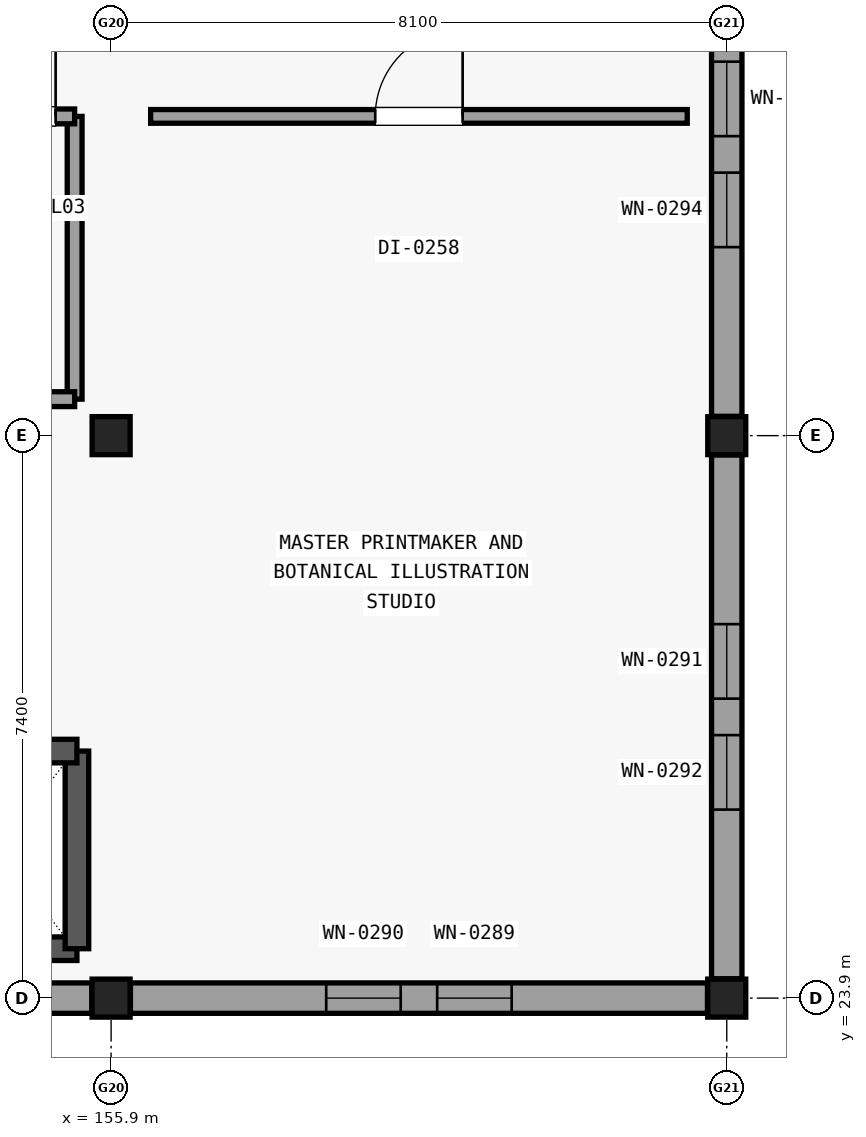
"""IFC4 building model, lengths in metres.
Left out: names, types, materials, properties, quantities, classifications, styles, units other than length and angle.
Written with IfcOpenShell. Run it as: python <this file> out.ifc"""

import sys

from ifc_helpers import new_model, si_unit, direction, frame, frame_2d, origin, origin_2d, place, context, subcontext, project, spatial, rectangle, extrude, element, fill, save


model = new_model("IFC4")
c1 = context("Model", 3, precision=1e-05, world=origin(), true_north=direction((0.0, 1.0)))
c2 = subcontext(c1, "Body", "Model", "MODEL_VIEW")
j1 = project(units=[si_unit("LENGTHUNIT", "METRE"), si_unit("PLANEANGLEUNIT", "RADIAN")], contexts=[c1])
p1 = place(None, origin())
s1 = spatial("IfcSite", under=j1, at=p1, CompositionType="ELEMENT")
p2 = place(p1, origin())
s2 = spatial("IfcBuilding", under=s1, at=p2, CompositionType="ELEMENT")
p3 = place(p2, frame((0.0, 0.0, 13.8)))
s3 = spatial("IfcBuildingStorey", under=s2, at=p3, CompositionType="ELEMENT", Elevation=13.8)
for number, where, z_axis, x_axis in (
    (1, (155.9, 23.9, 0.0), (0.0, 0.0, 1.0), (1.0, 0.0, 0.0)),
    (2, (155.9, 31.3, 0.0), (0.0, 0.0, 1.0), (1.0, 0.0, 0.0)),
    (3, (164.0, 23.9, 0.0), (0.0, 0.0, 1.0), (1.0, 0.0, 0.0)),
    (4, (164.0, 31.3, 0.0), (0.0, 0.0, 1.0), (1.0, 0.0, 0.0)),
):
    element("IfcColumn", number, at=place(p3, frame(where, z_axis=z_axis, x_axis=x_axis)), inside=s3, PredefinedType="COLUMN", context=c2, shape_type="SweptSolid", body=[
        extrude(rectangle(XDim=0.5, YDim=0.5, at=origin_2d()), origin(), (0.0, 0.0, 1.0), 3.38),
    ])
p4 = place(p3, frame((155.646, 23.9, 0.0), z_axis=(0.0, 0.0, 1.0), x_axis=(-1.0, 0.0, 0.0)))
e5 = element("IfcWall", 5, at=p4, inside=s3, PredefinedType="SOLIDWALL", context=c2, shape_type="SweptSolid", body=[
    extrude(rectangle(XDim=7.592, YDim=0.4, at=frame_2d((3.796, 0.0))), origin(), (0.0, 0.0, 1.0), 2.908),
])
p5 = place(p4, frame((2.576, 0.0, 0.6)))
e6 = element("IfcOpeningElement", 6, at=p5, cuts=e5, PredefinedType="OPENING", context=c2, shape_type="SweptSolid", body=[
    extrude(rectangle(XDim=0.98, YDim=1.95, at=frame_2d((0.49, 0.975))), frame((0.0, 0.21, 0.0), z_axis=(0.0, -1.0, 0.0), x_axis=(1.0, 0.0, 0.0)), (0.0, 0.0, 1.0), 0.42),
])
p6 = place(p4, frame((4.036, 0.0, 0.6)))
e7 = element("IfcOpeningElement", 7, at=p6, cuts=e5, PredefinedType="OPENING", context=c2, shape_type="SweptSolid", body=[
    extrude(rectangle(XDim=0.98, YDim=1.95, at=frame_2d((0.49, 0.975))), frame((0.0, 0.21, 0.0), z_axis=(0.0, -1.0, 0.0), x_axis=(1.0, 0.0, 0.0)), (0.0, 0.0, 1.0), 0.42),
])
p7 = place(p3, frame((163.746, 23.9, 0.0), z_axis=(0.0, 0.0, 1.0), x_axis=(-1.0, 0.0, 0.0)))
e8 = element("IfcWall", 8, at=p7, inside=s3, PredefinedType="SOLIDWALL", context=c2, shape_type="SweptSolid", body=[
    extrude(rectangle(XDim=7.592, YDim=0.4, at=frame_2d((3.796, 0.0))), origin(), (0.0, 0.0, 1.0), 2.908),
])
p8 = place(p7, frame((2.576, 0.0, 0.6)))
e9 = element("IfcOpeningElement", 9, at=p8, cuts=e8, PredefinedType="OPENING", context=c2, shape_type="SweptSolid", body=[
    extrude(rectangle(XDim=0.98, YDim=1.95, at=frame_2d((0.49, 0.975))), frame((0.0, 0.21, 0.0), z_axis=(0.0, -1.0, 0.0), x_axis=(1.0, 0.0, 0.0)), (0.0, 0.0, 1.0), 0.42),
])
p9 = place(p7, frame((4.036, 0.0, 0.6)))
e10 = element("IfcOpeningElement", 10, at=p9, cuts=e8, PredefinedType="OPENING", context=c2, shape_type="SweptSolid", body=[
    extrude(rectangle(XDim=0.98, YDim=1.95, at=frame_2d((0.49, 0.975))), frame((0.0, 0.21, 0.0), z_axis=(0.0, -1.0, 0.0), x_axis=(1.0, 0.0, 0.0)), (0.0, 0.0, 1.0), 0.42),
])
p10 = place(p3, frame((164.0, 31.046, 0.0), z_axis=(0.0, 0.0, 1.0), x_axis=(0.0, -1.0, 0.0)))
e11 = element("IfcWall", 11, at=p10, inside=s3, PredefinedType="SOLIDWALL", context=c2, shape_type="SweptSolid", body=[
    extrude(rectangle(XDim=6.892, YDim=0.4, at=frame_2d((3.446, 0.0))), origin(), (0.0, 0.0, 1.0), 2.908),
])
p11 = place(p10, frame((2.226, 0.0, 0.6)))
e12 = element("IfcOpeningElement", 12, at=p11, cuts=e11, PredefinedType="OPENING", context=c2, shape_type="SweptSolid", body=[
    extrude(rectangle(XDim=0.98, YDim=1.95, at=frame_2d((0.49, 0.975))), frame((0.0, 0.21, 0.0), z_axis=(0.0, -1.0, 0.0), x_axis=(1.0, 0.0, 0.0)), (0.0, 0.0, 1.0), 0.42),
])
p12 = place(p10, frame((3.686, 0.0, 0.6)))
e13 = element("IfcOpeningElement", 13, at=p12, cuts=e11, PredefinedType="OPENING", context=c2, shape_type="SweptSolid", body=[
    extrude(rectangle(XDim=0.98, YDim=1.95, at=frame_2d((0.49, 0.975))), frame((0.0, 0.21, 0.0), z_axis=(0.0, -1.0, 0.0), x_axis=(1.0, 0.0, 0.0)), (0.0, 0.0, 1.0), 0.42),
])
p13 = place(p3, frame((164.0, 38.446, 0.0), z_axis=(0.0, 0.0, 1.0), x_axis=(0.0, -1.0, 0.0)))
e14 = element("IfcWall", 14, at=p13, inside=s3, PredefinedType="SOLIDWALL", context=c2, shape_type="SweptSolid", body=[
    extrude(rectangle(XDim=6.892, YDim=0.4, at=frame_2d((3.446, 0.0))), origin(), (0.0, 0.0, 1.0), 2.908),
])
p14 = place(p13, frame((2.226, 0.0, 0.6)))
e15 = element("IfcOpeningElement", 15, at=p14, cuts=e14, PredefinedType="OPENING", context=c2, shape_type="SweptSolid", body=[
    extrude(rectangle(XDim=0.98, YDim=1.95, at=frame_2d((0.49, 0.975))), frame((0.0, 0.21, 0.0), z_axis=(0.0, -1.0, 0.0), x_axis=(1.0, 0.0, 0.0)), (0.0, 0.0, 1.0), 0.42),
])
p15 = place(p13, frame((3.686, 0.0, 0.6)))
e16 = element("IfcOpeningElement", 16, at=p15, cuts=e14, PredefinedType="OPENING", context=c2, shape_type="SweptSolid", body=[
    extrude(rectangle(XDim=0.98, YDim=1.95, at=frame_2d((0.49, 0.975))), frame((0.0, 0.21, 0.0), z_axis=(0.0, -1.0, 0.0), x_axis=(1.0, 0.0, 0.0)), (0.0, 0.0, 1.0), 0.42),
])
p16 = place(p3, frame((153.35, 24.55, 0.0), z_axis=(0.0, 0.0, 1.0), x_axis=(1.0, 0.0, 0.0)))
e17 = element("IfcWall", 17, at=p16, inside=s3, PredefinedType="SHEAR", context=c2, shape_type="SweptSolid", body=[
    extrude(rectangle(XDim=2.1, YDim=0.31, at=frame_2d((1.05, 0.0))), origin(), (0.0, 0.0, 1.0), 3.375),
])
p17 = place(p3, frame((155.45, 24.55, 0.0), z_axis=(0.0, 0.0, 1.0), x_axis=(0.0, 1.0, 0.0)))
e18 = element("IfcWall", 18, at=p17, inside=s3, PredefinedType="SHEAR", context=c2, shape_type="SweptSolid", body=[
    extrude(rectangle(XDim=2.6, YDim=0.31, at=frame_2d((1.3, 0.0))), origin(), (0.0, 0.0, 1.0), 3.375),
])
p18 = place(p3, frame((153.35, 27.15, 0.0), z_axis=(0.0, 0.0, 1.0), x_axis=(1.0, 0.0, 0.0)))
e19 = element("IfcWall", 19, at=p18, inside=s3, PredefinedType="SHEAR", context=c2, shape_type="SweptSolid", body=[
    extrude(rectangle(XDim=2.1, YDim=0.31, at=frame_2d((1.05, 0.0))), origin(), (0.0, 0.0, 1.0), 3.375),
])
p19 = place(p18, frame((0.5, 0.0, 0.0)))
e20 = element("IfcOpeningElement", 20, at=p19, cuts=e19, PredefinedType="OPENING", context=c2, shape_type="SweptSolid", body=[
    extrude(rectangle(XDim=1.1, YDim=2.15, at=frame_2d((0.55, 1.075))), frame((0.0, 0.165, 0.0), z_axis=(0.0, -1.0, 0.0), x_axis=(1.0, 0.0, 0.0)), (0.0, 0.0, 1.0), 0.33),
])
p20 = place(p3, frame((155.42, 31.78, 0.0), z_axis=(0.0, 0.0, 1.0), x_axis=(0.0, 1.0, 0.0)))
e21 = element("IfcWall", 21, at=p20, inside=s3, PredefinedType="PARTITIONING", context=c2, shape_type="SweptSolid", body=[
    extrude(rectangle(XDim=3.72, YDim=0.195, at=frame_2d((1.86, 0.0))), origin(), (0.0, 0.0, 1.0), 2.913),
])
p21 = place(p3, frame((152.45, 31.78, 0.0), z_axis=(0.0, 0.0, 1.0), x_axis=(1.0, 0.0, 0.0)))
e22 = element("IfcWall", 22, at=p21, inside=s3, PredefinedType="PARTITIONING", context=c2, shape_type="SweptSolid", body=[
    extrude(rectangle(XDim=2.97, YDim=0.195, at=frame_2d((1.485, 0.0))), origin(), (0.0, 0.0, 1.0), 2.913),
])
p22 = place(p3, frame((152.45, 35.5, 0.0), z_axis=(0.0, 0.0, 1.0), x_axis=(1.0, 0.0, 0.0)))
e23 = element("IfcWall", 23, at=p22, inside=s3, PredefinedType="PARTITIONING", context=c2, shape_type="SweptSolid", body=[
    extrude(rectangle(XDim=2.97, YDim=0.195, at=frame_2d((1.485, 0.0))), origin(), (0.0, 0.0, 1.0), 2.913),
])
p23 = place(p22, frame((0.25, 0.0, 0.0)))
e24 = element("IfcOpeningElement", 24, at=p23, cuts=e23, PredefinedType="OPENING", context=c2, shape_type="SweptSolid", body=[
    extrude(rectangle(XDim=0.95, YDim=2.1, at=frame_2d((0.475, 1.05))), frame((0.0, 0.107, 0.0), z_axis=(0.0, -1.0, 0.0), x_axis=(1.0, 0.0, 0.0)), (0.0, 0.0, 1.0), 0.215),
])
p24 = place(p22, frame((1.82, 0.0, 0.0)))
e25 = element("IfcOpeningElement", 25, at=p24, cuts=e23, PredefinedType="OPENING", context=c2, shape_type="SweptSolid", body=[
    extrude(rectangle(XDim=0.9, YDim=2.1, at=frame_2d((0.45, 1.05))), frame((0.0, 0.107, 0.0), z_axis=(0.0, -1.0, 0.0), x_axis=(1.0, 0.0, 0.0)), (0.0, 0.0, 1.0), 0.215),
])
p25 = place(p3, frame((156.42, 35.5, 0.0), z_axis=(0.0, 0.0, 1.0), x_axis=(1.0, 0.0, 0.0)))
e26 = element("IfcWall", 26, at=p25, inside=s3, PredefinedType="PARTITIONING", context=c2, shape_type="SweptSolid", body=[
    extrude(rectangle(XDim=7.06, YDim=0.18, at=frame_2d((3.53, 0.0))), origin(), (0.0, 0.0, 1.0), 2.913),
])
p26 = place(p25, frame((2.955, 0.0, 0.0)))
e27 = element("IfcOpeningElement", 27, at=p26, cuts=e26, PredefinedType="OPENING", context=c2, shape_type="SweptSolid", body=[
    extrude(rectangle(XDim=1.15, YDim=2.15, at=frame_2d((0.575, 1.075))), frame((0.0, 0.1, 0.0), z_axis=(0.0, -1.0, 0.0), x_axis=(1.0, 0.0, 0.0)), (0.0, 0.0, 1.0), 0.2),
])
p27 = place(p8, origin())
e28 = element("IfcWindow", 28, at=p27, inside=s3, PartitioningType="SINGLE_PANEL", PredefinedType="WINDOW", context=c2, shape_type="SweptSolid", body=[
    extrude(rectangle(XDim=0.98, YDim=1.95, at=frame_2d((0.49, 0.975))), frame((0.0, 0.03, 0.0), z_axis=(0.0, -1.0, 0.0), x_axis=(1.0, 0.0, 0.0)), (0.0, 0.0, 1.0), 0.06),
])
fill(e9, e28)
p28 = place(p9, origin())
e29 = element("IfcWindow", 29, at=p28, inside=s3, PartitioningType="SINGLE_PANEL", PredefinedType="WINDOW", context=c2, shape_type="SweptSolid", body=[
    extrude(rectangle(XDim=0.98, YDim=1.95, at=frame_2d((0.49, 0.975))), frame((0.0, 0.03, 0.0), z_axis=(0.0, -1.0, 0.0), x_axis=(1.0, 0.0, 0.0)), (0.0, 0.0, 1.0), 0.06),
])
fill(e10, e29)
p29 = place(p11, origin())
e30 = element("IfcWindow", 30, at=p29, inside=s3, PartitioningType="SINGLE_PANEL", PredefinedType="WINDOW", context=c2, shape_type="SweptSolid", body=[
    extrude(rectangle(XDim=0.98, YDim=1.95, at=frame_2d((0.49, 0.975))), frame((0.0, 0.03, 0.0), z_axis=(0.0, -1.0, 0.0), x_axis=(1.0, 0.0, 0.0)), (0.0, 0.0, 1.0), 0.06),
])
fill(e12, e30)
p30 = place(p12, origin())
e31 = element("IfcWindow", 31, at=p30, inside=s3, PartitioningType="SINGLE_PANEL", PredefinedType="WINDOW", context=c2, shape_type="SweptSolid", body=[
    extrude(rectangle(XDim=0.98, YDim=1.95, at=frame_2d((0.49, 0.975))), frame((0.0, 0.03, 0.0), z_axis=(0.0, -1.0, 0.0), x_axis=(1.0, 0.0, 0.0)), (0.0, 0.0, 1.0), 0.06),
])
fill(e13, e31)
p31 = place(p14, origin())
e32 = element("IfcWindow", 32, at=p31, inside=s3, PartitioningType="SINGLE_PANEL", PredefinedType="WINDOW", context=c2, shape_type="SweptSolid", body=[
    extrude(rectangle(XDim=0.98, YDim=1.95, at=frame_2d((0.49, 0.975))), frame((0.0, 0.03, 0.0), z_axis=(0.0, -1.0, 0.0), x_axis=(1.0, 0.0, 0.0)), (0.0, 0.0, 1.0), 0.06),
])
fill(e15, e32)
p32 = place(p15, origin())
e33 = element("IfcWindow", 33, at=p32, inside=s3, PartitioningType="SINGLE_PANEL", PredefinedType="WINDOW", context=c2, shape_type="SweptSolid", body=[
    extrude(rectangle(XDim=0.98, YDim=1.95, at=frame_2d((0.49, 0.975))), frame((0.0, 0.03, 0.0), z_axis=(0.0, -1.0, 0.0), x_axis=(1.0, 0.0, 0.0)), (0.0, 0.0, 1.0), 0.06),
])
fill(e16, e33)
p33 = place(p24, origin())
e34 = element("IfcDoor", 34, at=p33, inside=s3, OperationType="SINGLE_SWING_RIGHT", PredefinedType="DOOR", context=c2, shape_type="SweptSolid", body=[
    extrude(rectangle(XDim=0.9, YDim=2.1, at=frame_2d((0.45, 1.05))), frame((0.0, 0.025, 0.0), z_axis=(0.0, -1.0, 0.0), x_axis=(1.0, 0.0, 0.0)), (0.0, 0.0, 1.0), 0.05),
])
fill(e25, e34)
p34 = place(p26, origin())
e35 = element("IfcDoor", 35, at=p34, inside=s3, OperationType="SINGLE_SWING_RIGHT", PredefinedType="DOOR", context=c2, shape_type="SweptSolid", body=[
    extrude(rectangle(XDim=1.15, YDim=2.15, at=frame_2d((0.575, 1.075))), frame((0.0, 0.025, 0.0), z_axis=(0.0, -1.0, 0.0), x_axis=(1.0, 0.0, 0.0)), (0.0, 0.0, 1.0), 0.05),
])
fill(e27, e35)
save(model, sys.argv[1])
